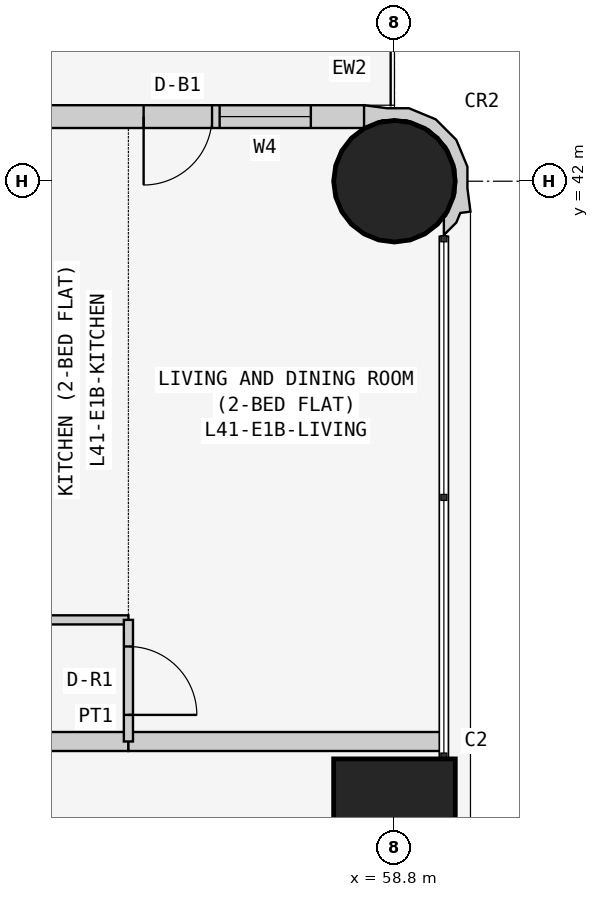
"""IFC4 building model, lengths in metres.
Left out: names, types, materials, properties, quantities, classifications, styles, units other than length and angle.
Written with IfcOpenShell. Run it as: python <this file> out.ifc"""

import sys

from ifc_helpers import new_model, si_unit, direction, frame, frame_2d, origin, origin_2d, place, context, subcontext, project, spatial, polyline, rectangle, circle, outline, extrude, element, fill, save


model = new_model("IFC4")
c1 = context("Model", 3, precision=1e-05, world=origin(), true_north=direction((0.0, 1.0)))
c2 = subcontext(c1, "Body", "Model", "MODEL_VIEW")
j1 = project(units=[si_unit("LENGTHUNIT", "METRE"), si_unit("PLANEANGLEUNIT", "RADIAN")], contexts=[c1])
p1 = place(None, origin())
s1 = spatial("IfcSite", under=j1, at=p1, CompositionType="ELEMENT")
p2 = place(p1, origin())
s2 = spatial("IfcBuilding", under=s1, at=p2, CompositionType="ELEMENT")
p3 = place(p2, frame((0.0, 0.0, 159.3)))
s3 = spatial("IfcBuildingStorey", under=s2, at=p3, CompositionType="ELEMENT", Elevation=159.3)
p4 = place(p3, frame((58.8, 33.6, 0.0), z_axis=(0.0, 0.0, 1.0), x_axis=(1.0, 0.0, 0.0)))
e1 = element("IfcColumn", 1, at=p4, inside=s3, PredefinedType="COLUMN", context=c2, shape_type="SweptSolid", body=[
    extrude(rectangle(XDim=1.6, YDim=1.6, at=origin_2d()), origin(), (0.0, 0.0, 1.0), 3.6),
])
p5 = place(p3, frame((58.8, 42.0, 0.0), z_axis=(0.0, 0.0, 1.0), x_axis=(1.0, 0.0, 0.0)))
e2 = element("IfcColumn", 2, at=p5, inside=s3, PredefinedType="COLUMN", context=c2, shape_type="SweptSolid", body=[
    extrude(circle(Radius=0.8, at=origin_2d()), origin(), (0.0, 0.0, 1.0), 3.6),
])
p6 = place(p3, frame((58.4, 42.85, 0.0), z_axis=(0.0, 0.0, 1.0), x_axis=(-1.0, 0.0, 0.0)))
e3 = element("IfcWall", 3, at=p6, inside=s3, PredefinedType="SOLIDWALL", context=c2, shape_type="SweptSolid", body=[
    extrude(rectangle(XDim=15.7, YDim=0.3, at=frame_2d((7.85, 0.0))), origin(), (0.0, 0.0, 1.0), 3.45),
])
p7 = place(p6, frame((12.4, 0.0, 0.9)))
e4 = element("IfcOpeningElement", 4, at=p7, cuts=e3, PredefinedType="OPENING", context=c2, shape_type="SweptSolid", body=[
    extrude(rectangle(XDim=1.8, YDim=1.5, at=frame_2d((0.9, 0.75))), frame((0.0, 0.16, 0.0), z_axis=(0.0, -1.0, 0.0), x_axis=(1.0, 0.0, 0.0)), (0.0, 0.0, 1.0), 0.32),
])
p8 = place(p6, frame((9.55, 0.0, 1.5)))
e5 = element("IfcOpeningElement", 5, at=p8, cuts=e3, PredefinedType="OPENING", context=c2, shape_type="SweptSolid", body=[
    extrude(rectangle(XDim=0.9, YDim=0.7, at=frame_2d((0.45, 0.35))), frame((0.0, 0.16, 0.0), z_axis=(0.0, -1.0, 0.0), x_axis=(1.0, 0.0, 0.0)), (0.0, 0.0, 1.0), 0.32),
])
p9 = place(p6, frame((5.1, 0.0, 0.9)))
e6 = element("IfcOpeningElement", 6, at=p9, cuts=e3, PredefinedType="OPENING", context=c2, shape_type="SweptSolid", body=[
    extrude(rectangle(XDim=1.8, YDim=1.5, at=frame_2d((0.9, 0.75))), frame((0.0, 0.16, 0.0), z_axis=(0.0, -1.0, 0.0), x_axis=(1.0, 0.0, 0.0)), (0.0, 0.0, 1.0), 0.32),
])
p10 = place(p6, frame((2.0, 0.0, 0.0)))
e7 = element("IfcOpeningElement", 7, at=p10, cuts=e3, PredefinedType="OPENING", context=c2, shape_type="SweptSolid", body=[
    extrude(rectangle(XDim=0.9, YDim=2.4, at=frame_2d((0.45, 1.2))), frame((0.0, 0.16, 0.0), z_axis=(0.0, -1.0, 0.0), x_axis=(1.0, 0.0, 0.0)), (0.0, 0.0, 1.0), 0.32),
])
p11 = place(p6, frame((0.7, 0.0, 0.9)))
e8 = element("IfcOpeningElement", 8, at=p11, cuts=e3, PredefinedType="OPENING", context=c2, shape_type="SweptSolid", body=[
    extrude(rectangle(XDim=1.2, YDim=1.5, at=frame_2d((0.6, 0.75))), frame((0.0, 0.16, 0.0), z_axis=(0.0, -1.0, 0.0), x_axis=(1.0, 0.0, 0.0)), (0.0, 0.0, 1.0), 0.32),
])
p12 = place(p3, frame((59.395, 41.352, 0.0), z_axis=(0.0, 0.0, 1.0), x_axis=(0.93923434088, 0.343276641956, 0.0)))
e9 = element("IfcWall", 9, at=p12, inside=s3, PredefinedType="SOLIDWALL", context=c2, shape_type="SweptSolid", body=[
    extrude(outline(polyline([(0.532, 0.393), (0.631, 0.663), (0.614, 1.044), (0.453, 1.391), (0.172, 1.649), (-0.097, 1.748), (-0.369, 1.89), (-0.509, 1.621), (-0.491, 1.615), (-0.479, 1.609), (-0.211, 1.62), (0.088, 1.511), (0.323, 1.295), (0.457, 1.006), (0.47, 0.688), (0.361, 0.389), (0.145, 0.154), (0.108, 0.136), (0.031, -0.075), (0.241, 0.023), (0.333, 0.124), (0.465, 0.094), (0.532, 0.393)])), origin(), (0.0, 0.0, 1.0), 3.45),
])
p13 = place(p3, frame((55.3, 34.629, 0.0), z_axis=(0.0, 0.0, 1.0), x_axis=(-1.0, 0.0, 0.0)))
e10 = element("IfcWall", 10, at=p13, inside=s3, PredefinedType="PARTITIONING", context=c2, shape_type="SweptSolid", body=[
    extrude(rectangle(XDim=6.3, YDim=0.25, at=frame_2d((3.15, 0.0))), origin(), (0.0, 0.0, 1.0), 3.45),
])
p14 = place(p3, frame((59.45, 34.629, 0.0), z_axis=(0.0, 0.0, 1.0), x_axis=(-1.0, 0.0, 0.0)))
e11 = element("IfcWall", 11, at=p14, inside=s3, PredefinedType="PARTITIONING", context=c2, shape_type="SweptSolid", body=[
    extrude(rectangle(XDim=4.15, YDim=0.25, at=frame_2d((2.075, 0.0))), origin(), (0.0, 0.0, 1.0), 3.45),
])
p15 = place(p3, frame((55.3, 36.229, 0.0), z_axis=(0.0, 0.0, 1.0), x_axis=(-1.0, 0.0, 0.0)))
e12 = element("IfcWall", 12, at=p15, inside=s3, PredefinedType="PARTITIONING", context=c2, shape_type="SweptSolid", body=[
    extrude(rectangle(XDim=1.2, YDim=0.12, at=frame_2d((0.6, 0.0))), origin(), (0.0, 0.0, 1.0), 3.45),
])
p16 = place(p3, frame((55.3, 34.629, 0.0), z_axis=(0.0, 0.0, 1.0), x_axis=(0.0, 1.0, 0.0)))
e13 = element("IfcWall", 13, at=p16, inside=s3, PredefinedType="PARTITIONING", context=c2, shape_type="SweptSolid", body=[
    extrude(rectangle(XDim=1.6, YDim=0.12, at=frame_2d((0.8, 0.0))), origin(), (0.0, 0.0, 1.0), 3.45),
])
p17 = place(p16, frame((0.35, 0.0, 0.0)))
e14 = element("IfcOpeningElement", 14, at=p17, cuts=e13, PredefinedType="OPENING", context=c2, shape_type="SweptSolid", body=[
    extrude(rectangle(XDim=0.9, YDim=2.1, at=frame_2d((0.45, 1.05))), frame((0.0, 0.07, 0.0), z_axis=(0.0, -1.0, 0.0), x_axis=(1.0, 0.0, 0.0)), (0.0, 0.0, 1.0), 0.14),
])
p18 = place(p10, origin())
e15 = element("IfcDoor", 15, at=p18, inside=s3, OperationType="SINGLE_SWING_RIGHT", PredefinedType="DOOR", context=c2, shape_type="SweptSolid", body=[
    extrude(rectangle(XDim=0.9, YDim=2.4, at=frame_2d((0.45, 1.2))), frame((0.0, 0.025, 0.0), z_axis=(0.0, -1.0, 0.0), x_axis=(1.0, 0.0, 0.0)), (0.0, 0.0, 1.0), 0.05),
])
fill(e7, e15)
p19 = place(p11, origin())
e16 = element("IfcWindow", 16, at=p19, inside=s3, PartitioningType="SINGLE_PANEL", PredefinedType="WINDOW", context=c2, shape_type="SweptSolid", body=[
    extrude(rectangle(XDim=1.2, YDim=1.5, at=frame_2d((0.6, 0.75))), frame((0.0, 0.03, 0.0), z_axis=(0.0, -1.0, 0.0), x_axis=(1.0, 0.0, 0.0)), (0.0, 0.0, 1.0), 0.06),
])
fill(e8, e16)
p20 = place(p17, frame((0.9, 0.0, 0.0), z_axis=(0.0, 0.0, 1.0), x_axis=(-1.0, 0.0, 0.0)))
e17 = element("IfcDoor", 17, at=p20, inside=s3, OperationType="SINGLE_SWING_RIGHT", PredefinedType="DOOR", context=c2, shape_type="SweptSolid", body=[
    extrude(rectangle(XDim=0.9, YDim=2.1, at=frame_2d((0.45, 1.05))), frame((0.0, 0.025, 0.0), z_axis=(0.0, -1.0, 0.0), x_axis=(1.0, 0.0, 0.0)), (0.0, 0.0, 1.0), 0.05),
])
fill(e14, e17)
save(model, sys.argv[1])
